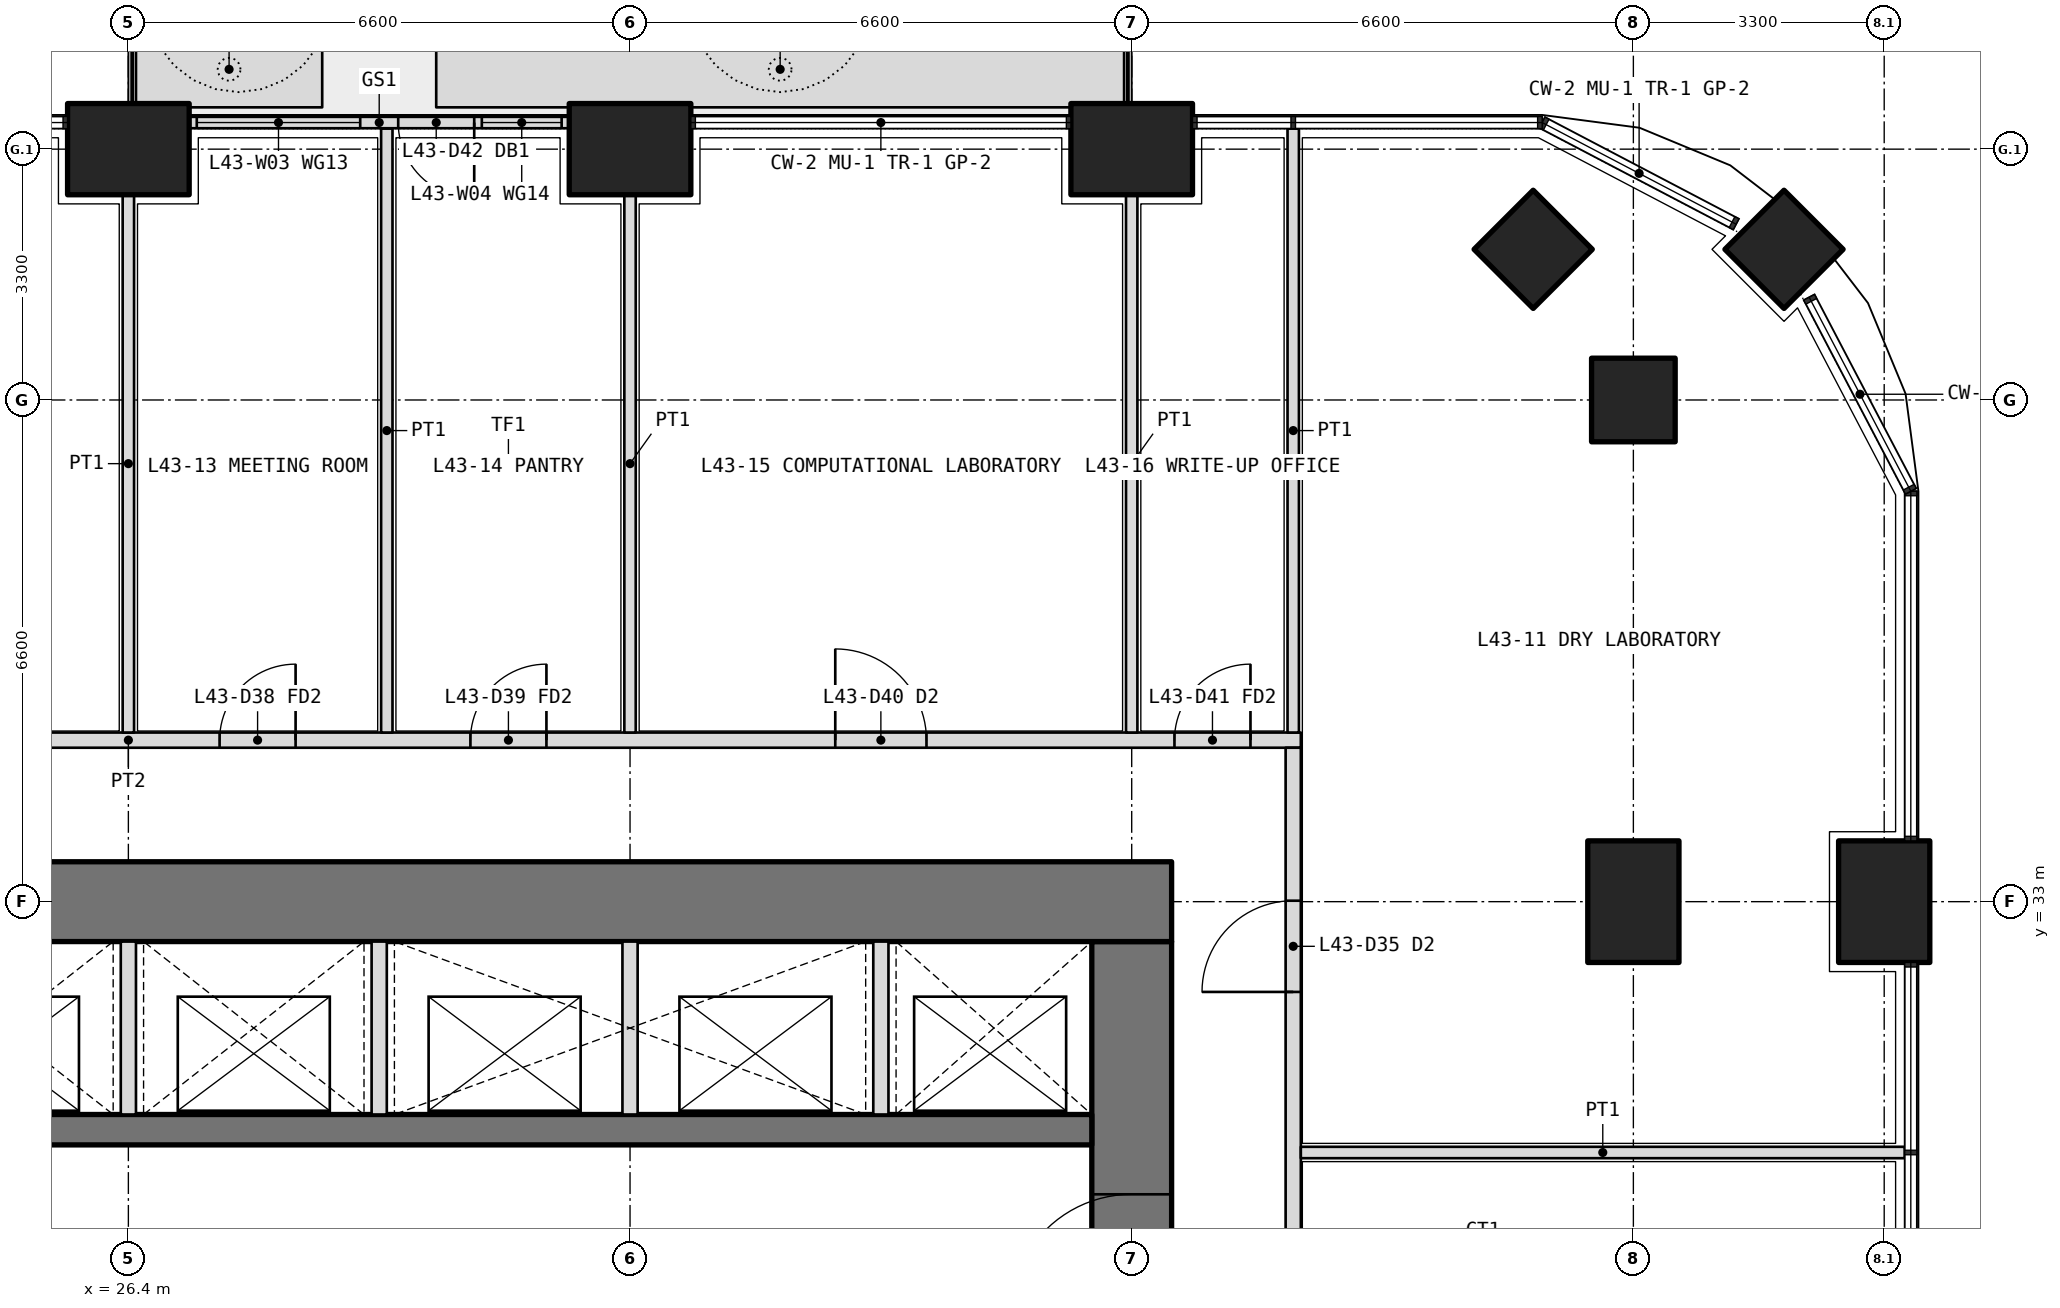
"""IFC4 building model, lengths in metres.
Left out: names, types, materials, properties, quantities, classifications, styles, units other than length and angle.
Written with IfcOpenShell. Run it as: python <this file> out.ifc"""

import sys

from ifc_helpers import new_model, si_unit, direction, frame, frame_2d, origin, origin_2d, place, context, subcontext, project, spatial, polyline, rectangle, outline, extrude, element, fill, save


model = new_model("IFC4")
c1 = context("Model", 3, precision=1e-05, world=origin(), true_north=direction((0.0, 1.0)))
c2 = subcontext(c1, "Body", "Model", "MODEL_VIEW")
j1 = project(units=[si_unit("LENGTHUNIT", "METRE"), si_unit("PLANEANGLEUNIT", "RADIAN")], contexts=[c1])
p1 = place(None, origin())
s1 = spatial("IfcSite", under=j1, at=p1, CompositionType="ELEMENT")
p2 = place(p1, origin())
s2 = spatial("IfcBuilding", under=s1, at=p2, CompositionType="ELEMENT")
p3 = place(p2, frame((0.0, 0.0, 189.3)))
s3 = spatial("IfcBuildingStorey", under=s2, at=p3, CompositionType="ELEMENT", Elevation=189.3)
p4 = place(p3, frame((48.182, 41.582, 0.0), z_axis=(0.0, 0.0, 1.0), x_axis=(0.707106781187, 0.707106781187, 0.0)))
e1 = element("IfcColumn", 1, at=p4, inside=s3, PredefinedType="COLUMN", context=c2, shape_type="SweptSolid", body=[
    extrude(rectangle(XDim=1.1, YDim=1.1, at=origin_2d()), origin(), (0.0, 0.0, 1.0), 4.2),
])
for number, where, z_axis, x_axis in (
    (2, (49.5, 33.0, 0.0), (0.0, 0.0, 1.0), (0.0, 1.0, 0.0)),
    (3, (26.4, 42.9, 0.0), (0.0, 0.0, 1.0), (1.0, 0.0, 0.0)),
    (4, (33.0, 42.9, 0.0), (0.0, 0.0, 1.0), (1.0, 0.0, 0.0)),
    (5, (39.6, 42.9, 0.0), (0.0, 0.0, 1.0), (1.0, 0.0, 0.0)),
):
    element("IfcColumn", number, at=place(p3, frame(where, z_axis=z_axis, x_axis=x_axis)), inside=s3, PredefinedType="COLUMN", context=c2, shape_type="SweptSolid", body=[
        extrude(rectangle(XDim=1.6, YDim=1.2, at=origin_2d()), origin(), (0.0, 0.0, 1.0), 4.2),
    ])
for number, where, z_axis, x_axis in (
    (6, (46.2, 39.6, 0.0), (0.0, 0.0, 1.0), (1.0, 0.0, 0.0)),
    (7, (44.882, 41.582, 0.0), (0.0, 0.0, 1.0), (0.707, 0.707, 0.0)),
):
    element("IfcColumn", number, at=place(p3, frame(where, z_axis=z_axis, x_axis=x_axis)), inside=s3, PredefinedType="COLUMN", context=c2, shape_type="SweptSolid", body=[
        extrude(rectangle(XDim=1.1, YDim=1.1, at=origin_2d()), origin(), (0.0, 0.0, 1.0), 4.2),
    ])
p5 = place(p3, frame((46.2, 33.0, 0.0), z_axis=(0.0, 0.0, 1.0), x_axis=(0.0, 1.0, 0.0)))
e8 = element("IfcColumn", 8, at=p5, inside=s3, PredefinedType="COLUMN", context=c2, shape_type="SweptSolid", body=[
    extrude(rectangle(XDim=1.6, YDim=1.2, at=origin_2d()), origin(), (0.0, 0.0, 1.0), 4.2),
])
p6 = place(p3, origin())
e9 = element("IfcWall", 9, at=p6, inside=s3, PredefinedType="USERDEFINED", context=c2, shape_type="SweptSolid", body=[
    extrude(outline(polyline([(26.5, 43.45), (28.95, 43.45), (28.95, 44.45), (26.5, 44.45), (26.5, 43.45)]), holes=[polyline([(26.65, 43.6), (28.8, 43.6), (28.8, 44.3), (26.65, 44.3), (26.65, 43.6)])]), origin(), (0.0, 0.0, 1.0), 1.05),
])
p7 = place(p3, origin())
e10 = element("IfcWall", 10, at=p7, inside=s3, PredefinedType="USERDEFINED", context=c2, shape_type="SweptSolid", body=[
    extrude(outline(polyline([(30.45, 43.45), (39.5, 43.45), (39.5, 44.45), (30.45, 44.45), (30.45, 43.45)]), holes=[polyline([(30.6, 43.6), (39.35, 43.6), (39.35, 44.3), (30.6, 44.3), (30.6, 43.6)])]), origin(), (0.0, 0.0, 1.0), 1.05),
])
p8 = place(p3, frame((32.2, 43.25, 0.0), z_axis=(0.0, 0.0, 1.0), x_axis=(-1.0, 0.0, 0.0)))
e11 = element("IfcWall", 11, at=p8, inside=s3, PredefinedType="SOLIDWALL", context=c2, shape_type="SweptSolid", body=[
    extrude(rectangle(XDim=5.0, YDim=0.15, at=frame_2d((2.5, 0.0))), origin(), (0.0, 0.0, 1.0), 2.7),
])
p9 = place(p8, frame((1.25, 0.0, 0.0)))
e12 = element("IfcOpeningElement", 12, at=p9, cuts=e11, PredefinedType="OPENING", context=c2, shape_type="SweptSolid", body=[
    extrude(rectangle(XDim=1.0, YDim=2.4, at=frame_2d((0.5, 1.2))), frame((0.0, 0.085, 0.0), z_axis=(0.0, -1.0, 0.0), x_axis=(1.0, 0.0, 0.0)), (0.0, 0.0, 1.0), 0.17),
])
p10 = place(p8, frame((0.1, 0.0, 0.1)))
e13 = element("IfcOpeningElement", 13, at=p10, cuts=e11, PredefinedType="OPENING", context=c2, shape_type="SweptSolid", body=[
    extrude(rectangle(XDim=1.05, YDim=2.3, at=frame_2d((0.525, 1.15))), frame((0.0, 0.085, 0.0), z_axis=(0.0, -1.0, 0.0), x_axis=(1.0, 0.0, 0.0)), (0.0, 0.0, 1.0), 0.17),
])
p11 = place(p8, frame((2.75, 0.0, 0.1)))
e14 = element("IfcOpeningElement", 14, at=p11, cuts=e11, PredefinedType="OPENING", context=c2, shape_type="SweptSolid", body=[
    extrude(rectangle(XDim=2.15, YDim=2.3, at=frame_2d((1.075, 1.15))), frame((0.0, 0.085, 0.0), z_axis=(0.0, -1.0, 0.0), x_axis=(1.0, 0.0, 0.0)), (0.0, 0.0, 1.0), 0.17),
])
p12 = place(p3, frame((39.6, 13.725, 0.0), z_axis=(0.0, 0.0, 1.0), x_axis=(0.0, 1.0, 0.0)))
e15 = element("IfcWall", 15, at=p12, inside=s3, PredefinedType="SHEAR", context=c2, shape_type="SweptSolid", body=[
    extrude(rectangle(XDim=18.75, YDim=1.05, at=frame_2d((9.375, 0.0))), origin(), (0.0, 0.0, 1.0), 4.2),
])
p13 = place(p12, frame((3.025, 0.0, 0.0)))
e16 = element("IfcOpeningElement", 16, at=p13, cuts=e15, PredefinedType="OPENING", context=c2, shape_type="SweptSolid", body=[
    extrude(rectangle(XDim=1.6, YDim=2.1, at=frame_2d((0.8, 1.05))), frame((0.0, 0.535, 0.0), z_axis=(0.0, -1.0, 0.0), x_axis=(1.0, 0.0, 0.0)), (0.0, 0.0, 1.0), 1.07),
])
p14 = place(p12, frame((13.825, 0.0, 0.0)))
e17 = element("IfcOpeningElement", 17, at=p14, cuts=e15, PredefinedType="OPENING", context=c2, shape_type="SweptSolid", body=[
    extrude(rectangle(XDim=1.6, YDim=2.1, at=frame_2d((0.8, 1.05))), frame((0.0, 0.535, 0.0), z_axis=(0.0, -1.0, 0.0), x_axis=(1.0, 0.0, 0.0)), (0.0, 0.0, 1.0), 1.07),
])
p15 = place(p3, frame((40.125, 33.0, 0.0), z_axis=(0.0, 0.0, 1.0), x_axis=(-1.0, 0.0, 0.0)))
e18 = element("IfcWall", 18, at=p15, inside=s3, PredefinedType="SHEAR", context=c2, shape_type="SweptSolid", body=[
    extrude(rectangle(XDim=27.45, YDim=1.05, at=frame_2d((13.725, 0.0))), origin(), (0.0, 0.0, 1.0), 4.2),
])
p16 = place(p3, frame((13.725, 30.0, 0.0), z_axis=(0.0, 0.0, 1.0), x_axis=(1.0, 0.0, 0.0)))
e19 = element("IfcWall", 19, at=p16, inside=s3, PredefinedType="SHEAR", context=c2, shape_type="SweptSolid", body=[
    extrude(rectangle(XDim=25.35, YDim=0.4, at=frame_2d((12.675, 0.0))), origin(), (0.0, 0.0, 1.0), 4.2),
])
p17 = place(p16, frame((0.788, 0.0, 0.0)))
e20 = element("IfcOpeningElement", 20, at=p17, cuts=e19, PredefinedType="OPENING", context=c2, shape_type="SweptSolid", body=[
    extrude(rectangle(XDim=1.1, YDim=2.1, at=frame_2d((0.55, 1.05))), frame((0.0, 0.21, 0.0), z_axis=(0.0, -1.0, 0.0), x_axis=(1.0, 0.0, 0.0)), (0.0, 0.0, 1.0), 0.42),
])
p18 = place(p16, frame((3.875, 0.0, 0.0)))
e21 = element("IfcOpeningElement", 21, at=p18, cuts=e19, PredefinedType="OPENING", context=c2, shape_type="SweptSolid", body=[
    extrude(rectangle(XDim=1.1, YDim=2.1, at=frame_2d((0.55, 1.05))), frame((0.0, 0.21, 0.0), z_axis=(0.0, -1.0, 0.0), x_axis=(1.0, 0.0, 0.0)), (0.0, 0.0, 1.0), 0.42),
])
p19 = place(p16, frame((7.175, 0.0, 0.0)))
e22 = element("IfcOpeningElement", 22, at=p19, cuts=e19, PredefinedType="OPENING", context=c2, shape_type="SweptSolid", body=[
    extrude(rectangle(XDim=1.1, YDim=2.1, at=frame_2d((0.55, 1.05))), frame((0.0, 0.21, 0.0), z_axis=(0.0, -1.0, 0.0), x_axis=(1.0, 0.0, 0.0)), (0.0, 0.0, 1.0), 0.42),
])
p20 = place(p16, frame((10.475, 0.0, 0.0)))
e23 = element("IfcOpeningElement", 23, at=p20, cuts=e19, PredefinedType="OPENING", context=c2, shape_type="SweptSolid", body=[
    extrude(rectangle(XDim=1.1, YDim=2.1, at=frame_2d((0.55, 1.05))), frame((0.0, 0.21, 0.0), z_axis=(0.0, -1.0, 0.0), x_axis=(1.0, 0.0, 0.0)), (0.0, 0.0, 1.0), 0.42),
])
for number, where, z_axis, x_axis in (
    (24, (26.4, 30.2, 0.0), (0.0, 0.0, 1.0), (0.0, 1.0, 0.0)),
    (25, (29.7, 30.2, 0.0), (0.0, 0.0, 1.0), (0.0, 1.0, 0.0)),
    (26, (33.0, 30.2, 0.0), (0.0, 0.0, 1.0), (0.0, 1.0, 0.0)),
    (27, (36.3, 30.2, 0.0), (0.0, 0.0, 1.0), (0.0, 1.0, 0.0)),
):
    element("IfcWall", number, at=place(p3, frame(where, z_axis=z_axis, x_axis=x_axis)), inside=s3, PredefinedType="PARTITIONING", context=c2, shape_type="SweptSolid", body=[
        extrude(rectangle(XDim=2.275, YDim=0.2, at=frame_2d((1.138, 0.0))), origin(), (0.0, 0.0, 1.0), 4.2),
    ])
p21 = place(p3, frame((10.975, 35.125, 0.0), z_axis=(0.0, 0.0, 1.0), x_axis=(1.0, 0.0, 0.0)))
e28 = element("IfcWall", 28, at=p21, inside=s3, PredefinedType="PARTITIONING", context=c2, shape_type="SweptSolid", body=[
    extrude(rectangle(XDim=30.85, YDim=0.2, at=frame_2d((15.425, 0.0))), origin(), (0.0, 0.0, 1.0), 2.85),
])
p22 = place(p21, frame((7.262, 0.0, 0.0)))
e29 = element("IfcOpeningElement", 29, at=p22, cuts=e28, PredefinedType="OPENING", context=c2, shape_type="SweptSolid", body=[
    extrude(rectangle(XDim=1.0, YDim=2.1, at=frame_2d((0.5, 1.05))), frame((0.0, 0.11, 0.0), z_axis=(0.0, -1.0, 0.0), x_axis=(1.0, 0.0, 0.0)), (0.0, 0.0, 1.0), 0.22),
])
p23 = place(p21, frame((16.625, 0.0, 0.0)))
e30 = element("IfcOpeningElement", 30, at=p23, cuts=e28, PredefinedType="OPENING", context=c2, shape_type="SweptSolid", body=[
    extrude(rectangle(XDim=1.0, YDim=2.1, at=frame_2d((0.5, 1.05))), frame((0.0, 0.11, 0.0), z_axis=(0.0, -1.0, 0.0), x_axis=(1.0, 0.0, 0.0)), (0.0, 0.0, 1.0), 0.22),
])
p24 = place(p21, frame((19.925, 0.0, 0.0)))
e31 = element("IfcOpeningElement", 31, at=p24, cuts=e28, PredefinedType="OPENING", context=c2, shape_type="SweptSolid", body=[
    extrude(rectangle(XDim=1.0, YDim=2.1, at=frame_2d((0.5, 1.05))), frame((0.0, 0.11, 0.0), z_axis=(0.0, -1.0, 0.0), x_axis=(1.0, 0.0, 0.0)), (0.0, 0.0, 1.0), 0.22),
])
p25 = place(p21, frame((24.725, 0.0, 0.0)))
e32 = element("IfcOpeningElement", 32, at=p25, cuts=e28, PredefinedType="OPENING", context=c2, shape_type="SweptSolid", body=[
    extrude(rectangle(XDim=1.2, YDim=2.1, at=frame_2d((0.6, 1.05))), frame((0.0, 0.11, 0.0), z_axis=(0.0, -1.0, 0.0), x_axis=(1.0, 0.0, 0.0)), (0.0, 0.0, 1.0), 0.22),
])
p26 = place(p21, frame((29.188, 0.0, 0.0)))
e33 = element("IfcOpeningElement", 33, at=p26, cuts=e28, PredefinedType="OPENING", context=c2, shape_type="SweptSolid", body=[
    extrude(rectangle(XDim=1.0, YDim=2.1, at=frame_2d((0.5, 1.05))), frame((0.0, 0.11, 0.0), z_axis=(0.0, -1.0, 0.0), x_axis=(1.0, 0.0, 0.0)), (0.0, 0.0, 1.0), 0.22),
])
p27 = place(p3, frame((41.725, 11.175, 0.0), z_axis=(0.0, 0.0, 1.0), x_axis=(0.0, 1.0, 0.0)))
e34 = element("IfcWall", 34, at=p27, inside=s3, PredefinedType="PARTITIONING", context=c2, shape_type="SweptSolid", body=[
    extrude(rectangle(XDim=23.85, YDim=0.2, at=frame_2d((11.925, 0.0))), origin(), (0.0, 0.0, 1.0), 2.85),
])
p28 = place(p27, frame((2.012, 0.0, 0.0)))
e35 = element("IfcOpeningElement", 35, at=p28, cuts=e34, PredefinedType="OPENING", context=c2, shape_type="SweptSolid", body=[
    extrude(rectangle(XDim=1.2, YDim=2.1, at=frame_2d((0.6, 1.05))), frame((0.0, 0.11, 0.0), z_axis=(0.0, -1.0, 0.0), x_axis=(1.0, 0.0, 0.0)), (0.0, 0.0, 1.0), 0.22),
])
p29 = place(p27, frame((6.375, 0.0, 0.0)))
e36 = element("IfcOpeningElement", 36, at=p29, cuts=e34, PredefinedType="OPENING", context=c2, shape_type="SweptSolid", body=[
    extrude(rectangle(XDim=1.2, YDim=2.1, at=frame_2d((0.6, 1.05))), frame((0.0, 0.11, 0.0), z_axis=(0.0, -1.0, 0.0), x_axis=(1.0, 0.0, 0.0)), (0.0, 0.0, 1.0), 0.22),
])
p30 = place(p27, frame((9.625, 0.0, 0.0)))
e37 = element("IfcOpeningElement", 37, at=p30, cuts=e34, PredefinedType="OPENING", context=c2, shape_type="SweptSolid", body=[
    extrude(rectangle(XDim=1.0, YDim=2.1, at=frame_2d((0.5, 1.05))), frame((0.0, 0.11, 0.0), z_axis=(0.0, -1.0, 0.0), x_axis=(1.0, 0.0, 0.0)), (0.0, 0.0, 1.0), 0.22),
])
p31 = place(p27, frame((12.975, 0.0, 0.0)))
e38 = element("IfcOpeningElement", 38, at=p31, cuts=e34, PredefinedType="OPENING", context=c2, shape_type="SweptSolid", body=[
    extrude(rectangle(XDim=0.9, YDim=2.1, at=frame_2d((0.45, 1.05))), frame((0.0, 0.11, 0.0), z_axis=(0.0, -1.0, 0.0), x_axis=(1.0, 0.0, 0.0)), (0.0, 0.0, 1.0), 0.22),
])
p32 = place(p27, frame((16.375, 0.0, 0.0)))
e39 = element("IfcOpeningElement", 39, at=p32, cuts=e34, PredefinedType="OPENING", context=c2, shape_type="SweptSolid", body=[
    extrude(rectangle(XDim=1.0, YDim=2.1, at=frame_2d((0.5, 1.05))), frame((0.0, 0.11, 0.0), z_axis=(0.0, -1.0, 0.0), x_axis=(1.0, 0.0, 0.0)), (0.0, 0.0, 1.0), 0.22),
])
p33 = place(p27, frame((20.637, 0.0, 0.0)))
e40 = element("IfcOpeningElement", 40, at=p33, cuts=e34, PredefinedType="OPENING", context=c2, shape_type="SweptSolid", body=[
    extrude(rectangle(XDim=1.2, YDim=2.1, at=frame_2d((0.6, 1.05))), frame((0.0, 0.11, 0.0), z_axis=(0.0, -1.0, 0.0), x_axis=(1.0, 0.0, 0.0)), (0.0, 0.0, 1.0), 0.22),
])
p34 = place(p3, frame((41.725, 43.17, 0.0), z_axis=(0.0, 0.0, 1.0), x_axis=(0.0, -1.0, 0.0)))
e41 = element("IfcWall", 41, at=p34, inside=s3, PredefinedType="PARTITIONING", context=c2, shape_type="SweptSolid", body=[
    extrude(rectangle(XDim=7.945, YDim=0.15, at=frame_2d((3.972, 0.0))), origin(), (0.0, 0.0, 1.0), 2.7),
])
p35 = place(p3, frame((49.77, 29.7, 0.0), z_axis=(0.0, 0.0, 1.0), x_axis=(-1.0, 0.0, 0.0)))
e42 = element("IfcWall", 42, at=p35, inside=s3, PredefinedType="PARTITIONING", context=c2, shape_type="SweptSolid", body=[
    extrude(rectangle(XDim=7.945, YDim=0.15, at=frame_2d((3.973, 0.0))), origin(), (0.0, 0.0, 1.0), 2.7),
])
p36 = place(p3, frame((29.8, 43.17, 0.0), z_axis=(0.0, 0.0, 1.0), x_axis=(0.0, -1.0, 0.0)))
e43 = element("IfcWall", 43, at=p36, inside=s3, PredefinedType="PARTITIONING", context=c2, shape_type="SweptSolid", body=[
    extrude(rectangle(XDim=7.945, YDim=0.15, at=frame_2d((3.972, 0.0))), origin(), (0.0, 0.0, 1.0), 2.7),
])
for number, where, z_axis, x_axis in (
    (44, (33.0, 42.3, 0.0), (0.0, 0.0, 1.0), (0.0, -1.0, 0.0)),
    (45, (26.4, 42.3, 0.0), (0.0, 0.0, 1.0), (0.0, -1.0, 0.0)),
    (46, (39.6, 42.3, 0.0), (0.0, 0.0, 1.0), (0.0, -1.0, 0.0)),
):
    element("IfcWall", number, at=place(p3, frame(where, z_axis=z_axis, x_axis=x_axis)), inside=s3, PredefinedType="PARTITIONING", context=c2, shape_type="SweptSolid", body=[
        extrude(rectangle(XDim=7.075, YDim=0.15, at=frame_2d((3.538, 0.0))), origin(), (0.0, 0.0, 1.0), 2.85),
    ])
p37 = place(p9, origin())
e47 = element("IfcDoor", 47, at=p37, inside=s3, OperationType="SINGLE_SWING_LEFT", PredefinedType="DOOR", context=c2, shape_type="SweptSolid", body=[
    extrude(rectangle(XDim=1.0, YDim=2.4, at=frame_2d((0.5, 1.2))), frame((0.0, 0.025, 0.0), z_axis=(0.0, -1.0, 0.0), x_axis=(1.0, 0.0, 0.0)), (0.0, 0.0, 1.0), 0.05),
])
fill(e12, e47)
p38 = place(p10, origin())
e48 = element("IfcWindow", 48, at=p38, inside=s3, PartitioningType="SINGLE_PANEL", PredefinedType="WINDOW", context=c2, shape_type="SweptSolid", body=[
    extrude(rectangle(XDim=1.05, YDim=2.3, at=frame_2d((0.525, 1.15))), frame((0.0, 0.03, 0.0), z_axis=(0.0, -1.0, 0.0), x_axis=(1.0, 0.0, 0.0)), (0.0, 0.0, 1.0), 0.06),
])
fill(e13, e48)
p39 = place(p11, origin())
e49 = element("IfcWindow", 49, at=p39, inside=s3, PartitioningType="SINGLE_PANEL", PredefinedType="WINDOW", context=c2, shape_type="SweptSolid", body=[
    extrude(rectangle(XDim=2.15, YDim=2.3, at=frame_2d((1.075, 1.15))), frame((0.0, 0.03, 0.0), z_axis=(0.0, -1.0, 0.0), x_axis=(1.0, 0.0, 0.0)), (0.0, 0.0, 1.0), 0.06),
])
fill(e14, e49)
p40 = place(p33, origin())
e50 = element("IfcDoor", 50, at=p40, inside=s3, OperationType="DOUBLE_DOOR_SINGLE_SWING", PredefinedType="DOOR", context=c2, shape_type="SweptSolid", body=[
    extrude(rectangle(XDim=1.2, YDim=2.1, at=frame_2d((0.6, 1.05))), frame((0.0, 0.025, 0.0), z_axis=(0.0, -1.0, 0.0), x_axis=(1.0, 0.0, 0.0)), (0.0, 0.0, 1.0), 0.05),
])
fill(e40, e50)
p41 = place(p23, origin())
e51 = element("IfcDoor", 51, at=p41, inside=s3, OperationType="SINGLE_SWING_RIGHT", PredefinedType="DOOR", context=c2, shape_type="SweptSolid", body=[
    extrude(rectangle(XDim=1.0, YDim=2.1, at=frame_2d((0.5, 1.05))), frame((0.0, 0.025, 0.0), z_axis=(0.0, -1.0, 0.0), x_axis=(1.0, 0.0, 0.0)), (0.0, 0.0, 1.0), 0.05),
])
fill(e30, e51)
p42 = place(p24, origin())
e52 = element("IfcDoor", 52, at=p42, inside=s3, OperationType="SINGLE_SWING_RIGHT", PredefinedType="DOOR", context=c2, shape_type="SweptSolid", body=[
    extrude(rectangle(XDim=1.0, YDim=2.1, at=frame_2d((0.5, 1.05))), frame((0.0, 0.025, 0.0), z_axis=(0.0, -1.0, 0.0), x_axis=(1.0, 0.0, 0.0)), (0.0, 0.0, 1.0), 0.05),
])
fill(e31, e52)
p43 = place(p25, origin())
e53 = element("IfcDoor", 53, at=p43, inside=s3, OperationType="DOUBLE_DOOR_SINGLE_SWING", PredefinedType="DOOR", context=c2, shape_type="SweptSolid", body=[
    extrude(rectangle(XDim=1.2, YDim=2.1, at=frame_2d((0.6, 1.05))), frame((0.0, 0.025, 0.0), z_axis=(0.0, -1.0, 0.0), x_axis=(1.0, 0.0, 0.0)), (0.0, 0.0, 1.0), 0.05),
])
fill(e32, e53)
p44 = place(p26, origin())
e54 = element("IfcDoor", 54, at=p44, inside=s3, OperationType="SINGLE_SWING_RIGHT", PredefinedType="DOOR", context=c2, shape_type="SweptSolid", body=[
    extrude(rectangle(XDim=1.0, YDim=2.1, at=frame_2d((0.5, 1.05))), frame((0.0, 0.025, 0.0), z_axis=(0.0, -1.0, 0.0), x_axis=(1.0, 0.0, 0.0)), (0.0, 0.0, 1.0), 0.05),
])
fill(e33, e54)
p45 = place(p14, origin())
e55 = element("IfcDoor", 55, at=p45, inside=s3, OperationType="DOUBLE_DOOR_DOUBLE_SWING", PredefinedType="DOOR", context=c2, shape_type="SweptSolid", body=[
    extrude(rectangle(XDim=1.6, YDim=2.1, at=frame_2d((0.8, 1.05))), frame((0.0, 0.025, 0.0), z_axis=(0.0, -1.0, 0.0), x_axis=(1.0, 0.0, 0.0)), (0.0, 0.0, 1.0), 0.05),
])
fill(e17, e55)
save(model, sys.argv[1])
